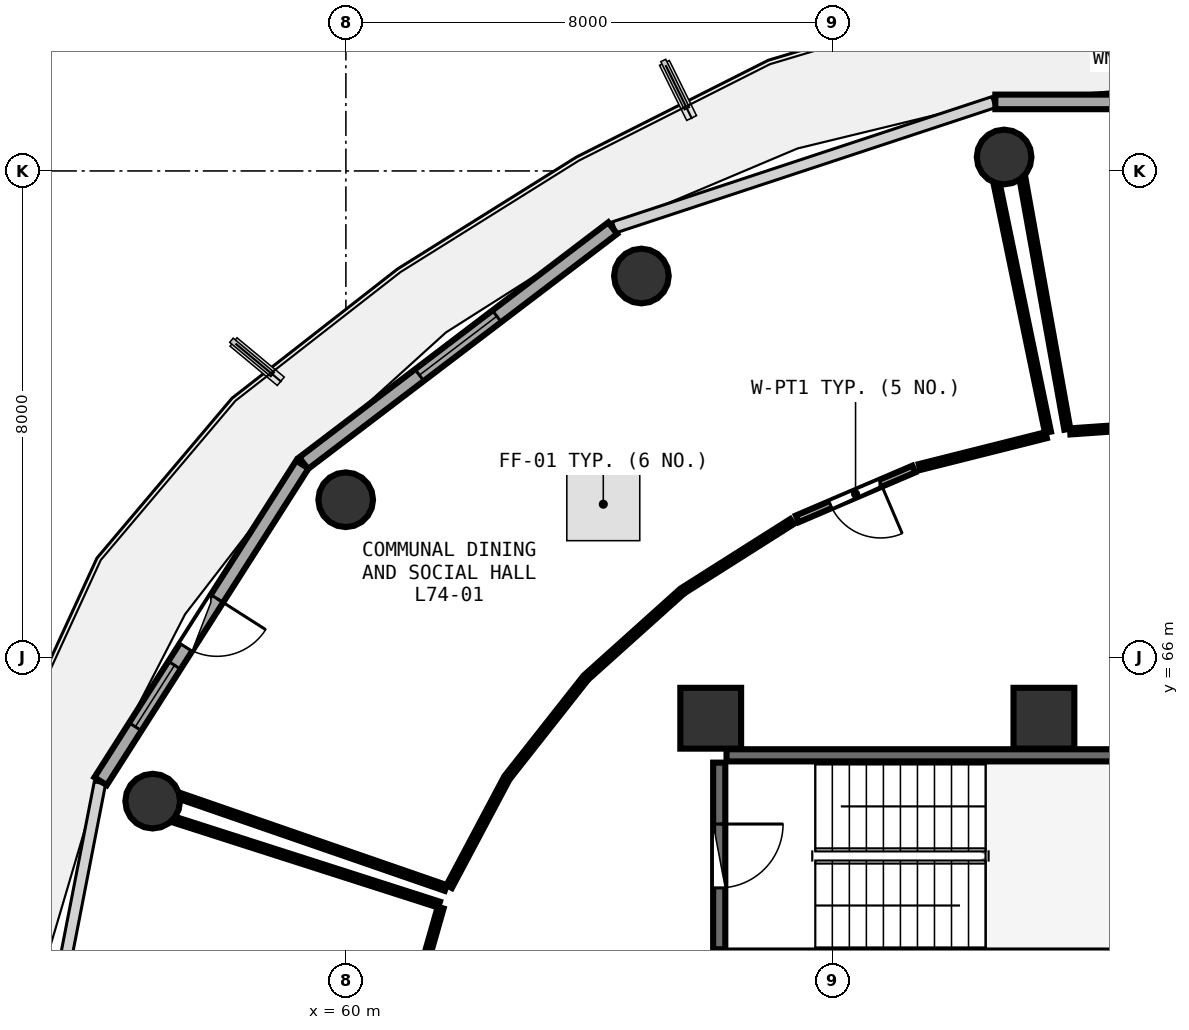
"""IFC4 building model, lengths in metres.
Left out: names, types, materials, properties, quantities, classifications, styles, units other than length and angle.
Written with IfcOpenShell. Run it as: python <this file> out.ifc"""

import sys

from ifc_helpers import new_model, si_unit, direction, frame, frame_2d, origin, origin_2d, place, context, subcontext, project, spatial, rectangle, circle, extrude, element, fill, save


model = new_model("IFC4")
c1 = context("Model", 3, precision=1e-05, world=origin(), true_north=direction((0.0, 1.0)))
c2 = subcontext(c1, "Body", "Model", "MODEL_VIEW")
j1 = project(units=[si_unit("LENGTHUNIT", "METRE"), si_unit("PLANEANGLEUNIT", "RADIAN")], contexts=[c1])
p1 = place(None, origin())
s1 = spatial("IfcSite", under=j1, at=p1, CompositionType="ELEMENT")
p2 = place(p1, origin())
s2 = spatial("IfcBuilding", under=s1, at=p2, CompositionType="ELEMENT")
p3 = place(p2, frame((0.0, 0.0, 289.95)))
s3 = spatial("IfcBuildingStorey", under=s2, at=p3, CompositionType="ELEMENT", Elevation=289.95)
for number, where, z_axis, x_axis in (
    (1, (71.48, 65.0, 0.0), (0.0, 0.0, 1.0), (1.0, 0.0, 0.0)),
    (2, (66.0, 65.0, 0.0), (0.0, 0.0, 1.0), (1.0, 0.0, 0.0)),
):
    element("IfcColumn", number, at=place(p3, frame(where, z_axis=z_axis, x_axis=x_axis)), inside=s3, PredefinedType="PILASTER", context=c2, shape_type="SweptSolid", body=[
        extrude(rectangle(XDim=1.0, YDim=1.0, at=origin_2d()), origin(), (0.0, 0.0, 1.0), 3.75),
    ])
for number, where, z_axis, x_axis in (
    (3, (70.826, 74.229, 0.0), (0.0, 0.0, 1.0), (1.0, 0.0, 0.0)),
    (4, (64.86, 72.272, 0.0), (0.0, 0.0, 1.0), (1.0, 0.0, 0.0)),
    (5, (59.997, 68.593, 0.0), (0.0, 0.0, 1.0), (1.0, 0.0, 0.0)),
    (6, (56.823, 63.636, 0.0), (0.0, 0.0, 1.0), (1.0, 0.0, 0.0)),
):
    element("IfcColumn", number, at=place(p3, frame(where, z_axis=z_axis, x_axis=x_axis)), inside=s3, PredefinedType="COLUMN", context=c2, shape_type="SweptSolid", body=[
        extrude(circle(Radius=0.45, at=origin_2d()), origin(), (0.0, 0.0, 1.0), 3.75),
    ])
p4 = place(p3, frame((77.319, 75.136, 0.0), z_axis=(0.0, 0.0, 1.0), x_axis=(-1.0, 0.0, 0.0)))
e7 = element("IfcWall", 7, at=p4, inside=s3, PredefinedType="SOLIDWALL", context=c2, shape_type="SweptSolid", body=[
    extrude(rectangle(XDim=6.638, YDim=0.24, at=frame_2d((3.319, 0.0))), origin(), (0.0, 0.0, 1.0), 3.415),
])
p5 = place(p4, frame((2.519, 0.0, 0.85)))
e8 = element("IfcOpeningElement", 8, at=p5, cuts=e7, PredefinedType="OPENING", context=c2, shape_type="SweptSolid", body=[
    extrude(rectangle(XDim=1.6, YDim=1.45, at=frame_2d((0.8, 0.725))), frame((0.0, 0.13, 0.0), z_axis=(0.0, -1.0, 0.0), x_axis=(1.0, 0.0, 0.0)), (0.0, 0.0, 1.0), 0.26),
])
p6 = place(p3, frame((64.388, 73.06, 0.0), z_axis=(0.0, 0.0, 1.0), x_axis=(-0.796010444211, -0.605282886514, 0.0)))
e9 = element("IfcWall", 9, at=p6, inside=s3, PredefinedType="SOLIDWALL", context=c2, shape_type="SweptSolid", body=[
    extrude(rectangle(XDim=6.387, YDim=0.24, at=frame_2d((3.194, 0.0))), origin(), (0.0, 0.0, 1.0), 3.415),
])
p7 = place(p6, frame((2.394, 0.0, 0.85)))
e10 = element("IfcOpeningElement", 10, at=p7, cuts=e9, PredefinedType="OPENING", context=c2, shape_type="SweptSolid", body=[
    extrude(rectangle(XDim=1.6, YDim=1.45, at=frame_2d((0.8, 0.725))), frame((0.0, 0.13, 0.0), z_axis=(0.0, -1.0, 0.0), x_axis=(1.0, 0.0, 0.0)), (0.0, 0.0, 1.0), 0.26),
])
p8 = place(p3, frame((59.284, 69.172, 0.0), z_axis=(0.0, 0.0, 1.0), x_axis=(-0.537271968456, -0.843409053728, 0.0)))
e11 = element("IfcWall", 11, at=p8, inside=s3, PredefinedType="SOLIDWALL", context=c2, shape_type="SweptSolid", body=[
    extrude(rectangle(XDim=6.175, YDim=0.24, at=frame_2d((3.087, 0.0))), origin(), (0.0, 0.0, 1.0), 3.415),
])
p9 = place(p8, frame((2.613, 0.0, 0.0)))
e12 = element("IfcOpeningElement", 12, at=p9, cuts=e11, PredefinedType="OPENING", context=c2, shape_type="SweptSolid", body=[
    extrude(rectangle(XDim=0.95, YDim=2.1, at=frame_2d((0.475, 1.05))), frame((0.0, 0.13, 0.0), z_axis=(0.0, -1.0, 0.0), x_axis=(1.0, 0.0, 0.0)), (0.0, 0.0, 1.0), 0.26),
])
p10 = place(p8, frame((3.913, 0.0, 0.85)))
e13 = element("IfcOpeningElement", 13, at=p10, cuts=e11, PredefinedType="OPENING", context=c2, shape_type="SweptSolid", body=[
    extrude(rectangle(XDim=1.2, YDim=1.45, at=frame_2d((0.6, 0.725))), frame((0.0, 0.13, 0.0), z_axis=(0.0, -1.0, 0.0), x_axis=(1.0, 0.0, 0.0)), (0.0, 0.0, 1.0), 0.26),
])
p11 = place(p3, frame((73.42, 64.39, 0.0), z_axis=(0.0, 0.0, 1.0), x_axis=(-1.0, 0.0, 0.0)))
e14 = element("IfcWall", 14, at=p11, inside=s3, PredefinedType="SHEAR", context=c2, shape_type="SweptSolid", body=[
    extrude(rectangle(XDim=7.16, YDim=0.2, at=frame_2d((3.58, 0.0))), origin(), (0.0, 0.0, 1.0), 3.43),
])
p12 = place(p3, frame((66.14, 64.27, 0.0), z_axis=(0.0, 0.0, 1.0), x_axis=(0.0, -1.0, 0.0)))
e15 = element("IfcWall", 15, at=p12, inside=s3, PredefinedType="SHEAR", context=c2, shape_type="SweptSolid", body=[
    extrude(rectangle(XDim=3.07, YDim=0.2, at=frame_2d((1.535, 0.0))), origin(), (0.0, 0.0, 1.0), 3.43),
])
p13 = place(p12, frame((1.01, 0.0, 0.0)))
e16 = element("IfcOpeningElement", 16, at=p13, cuts=e15, PredefinedType="OPENING", context=c2, shape_type="SweptSolid", body=[
    extrude(rectangle(XDim=1.05, YDim=2.1, at=frame_2d((0.525, 1.05))), frame((0.0, 0.11, 0.0), z_axis=(0.0, -1.0, 0.0), x_axis=(1.0, 0.0, 0.0)), (0.0, 0.0, 1.0), 0.22),
])
p14 = place(p3, frame((69.34, 69.097, 0.0), z_axis=(0.0, 0.0, 1.0), x_axis=(-0.919508345424, -0.39307048057, 0.0)))
e17 = element("IfcWall", 17, at=p14, inside=s3, PredefinedType="PARTITIONING", context=c2, shape_type="SweptSolid", body=[
    extrude(rectangle(XDim=2.083, YDim=0.12, at=frame_2d((1.042, 0.0))), origin(), (0.0, 0.0, 1.0), 3.42),
])
p15 = place(p14, frame((0.592, 0.0, 0.0)))
e18 = element("IfcOpeningElement", 18, at=p15, cuts=e17, PredefinedType="OPENING", context=c2, shape_type="SweptSolid", body=[
    extrude(rectangle(XDim=0.9, YDim=2.08, at=frame_2d((0.45, 1.04))), frame((0.0, 0.07, 0.0), z_axis=(0.0, -1.0, 0.0), x_axis=(1.0, 0.0, 0.0)), (0.0, 0.0, 1.0), 0.14),
])
p16 = place(p3, frame((71.516, 69.654, 0.0), z_axis=(0.0, 0.0, 1.0), x_axis=(-0.969827312174, -0.243792913272, 0.0)))
e19 = element("IfcWall", 19, at=p16, inside=s3, PredefinedType="PARTITIONING", context=c2, shape_type="SweptSolid", body=[
    extrude(rectangle(XDim=2.147, YDim=0.1, at=frame_2d((1.073, 0.0))), origin(), (0.0, 0.0, 1.0), 3.015),
])
p17 = place(p3, frame((67.335, 68.234, 0.0), z_axis=(0.0, 0.0, 1.0), x_axis=(-0.844856002064, -0.534993771717, 0.0)))
e20 = element("IfcWall", 20, at=p17, inside=s3, PredefinedType="PARTITIONING", context=c2, shape_type="SweptSolid", body=[
    extrude(rectangle(XDim=2.092, YDim=0.1, at=frame_2d((1.046, 0.0))), origin(), (0.0, 0.0, 1.0), 3.015),
])
p18 = place(p3, frame((65.504, 67.066, 0.0), z_axis=(0.0, 0.0, 1.0), x_axis=(-0.743943808924, -0.668242178527, 0.0)))
e21 = element("IfcWall", 21, at=p18, inside=s3, PredefinedType="PARTITIONING", context=c2, shape_type="SweptSolid", body=[
    extrude(rectangle(XDim=2.054, YDim=0.1, at=frame_2d((1.027, 0.0))), origin(), (0.0, 0.0, 1.0), 3.015),
])
p19 = place(p3, frame((63.921, 65.635, 0.0), z_axis=(0.0, 0.0, 1.0), x_axis=(-0.618820199788, -0.785532660259, 0.0)))
e22 = element("IfcWall", 22, at=p19, inside=s3, PredefinedType="PARTITIONING", context=c2, shape_type="SweptSolid", body=[
    extrude(rectangle(XDim=2.018, YDim=0.1, at=frame_2d((1.009, 0.0))), origin(), (0.0, 0.0, 1.0), 3.015),
])
p20 = place(p3, frame((62.629, 63.984, 0.0), z_axis=(0.0, 0.0, 1.0), x_axis=(-0.468933294906, -0.883233584579, 0.0)))
e23 = element("IfcWall", 23, at=p20, inside=s3, PredefinedType="PARTITIONING", context=c2, shape_type="SweptSolid", body=[
    extrude(rectangle(XDim=1.984, YDim=0.1, at=frame_2d((0.992, 0.0))), origin(), (0.0, 0.0, 1.0), 3.175),
])
p21 = place(p3, frame((61.642, 62.209, 0.0), z_axis=(0.0, 0.0, 1.0), x_axis=(-0.945103281494, 0.326771766388, 0.0)))
e24 = element("IfcWall", 24, at=p21, inside=s3, PredefinedType="PARTITIONING", context=c2, shape_type="SweptSolid", body=[
    extrude(rectangle(XDim=4.604, YDim=0.1, at=frame_2d((2.302, 0.0))), origin(), (0.0, 0.0, 1.0), 3.015),
])
p22 = place(p3, frame((70.707, 73.77, 0.0), z_axis=(0.0, 0.0, 1.0), x_axis=(0.202308141573, -0.979321916355, 0.0)))
e25 = element("IfcWall", 25, at=p22, inside=s3, PredefinedType="PARTITIONING", context=c2, shape_type="SweptSolid", body=[
    extrude(rectangle(XDim=4.153, YDim=0.1, at=frame_2d((2.076, 0.0))), origin(), (0.0, 0.0, 1.0), 3.015),
])
p23 = place(p3, frame((61.559, 61.885, 0.0), z_axis=(0.0, 0.0, 1.0), x_axis=(-0.274226302341, -0.961665188673, 0.0)))
e26 = element("IfcWall", 26, at=p23, inside=s3, PredefinedType="PARTITIONING", context=c2, shape_type="SweptSolid", body=[
    extrude(rectangle(XDim=1.955, YDim=0.1, at=frame_2d((0.978, 0.0))), origin(), (0.0, 0.0, 1.0), 3.42),
])
p24 = place(p3, frame((57.184, 63.329, 0.0), z_axis=(0.0, 0.0, 1.0), x_axis=(0.95227750557, -0.305233602976, 0.0)))
e27 = element("IfcWall", 27, at=p24, inside=s3, PredefinedType="PARTITIONING", context=c2, shape_type="SweptSolid", body=[
    extrude(rectangle(XDim=4.565, YDim=0.1, at=frame_2d((2.283, 0.0))), origin(), (0.0, 0.0, 1.0), 3.115),
])
p25 = place(p3, frame((74.067, 69.867, 0.0), z_axis=(0.0, 0.0, 1.0), x_axis=(-0.997574370957, -0.069608723664, 0.0)))
e28 = element("IfcWall", 28, at=p25, inside=s3, PredefinedType="PARTITIONING", context=c2, shape_type="SweptSolid", body=[
    extrude(rectangle(XDim=2.16, YDim=0.1, at=frame_2d((1.08, 0.0))), origin(), (0.0, 0.0, 1.0), 3.42),
])
p26 = place(p3, frame((71.865, 69.753, 0.0), z_axis=(0.0, 0.0, 1.0), x_axis=(-0.176199339585, 0.984354505618, 0.0)))
e29 = element("IfcWall", 29, at=p26, inside=s3, PredefinedType="PARTITIONING", context=c2, shape_type="SweptSolid", body=[
    extrude(rectangle(XDim=4.176, YDim=0.1, at=frame_2d((2.088, 0.0))), origin(), (0.0, 0.0, 1.0), 3.115),
])
p27 = place(p7, origin())
e30 = element("IfcWindow", 30, at=p27, inside=s3, PartitioningType="SINGLE_PANEL", PredefinedType="WINDOW", context=c2, shape_type="SweptSolid", body=[
    extrude(rectangle(XDim=1.6, YDim=1.45, at=frame_2d((0.8, 0.725))), frame((0.0, 0.03, 0.0), z_axis=(0.0, -1.0, 0.0), x_axis=(1.0, 0.0, 0.0)), (0.0, 0.0, 1.0), 0.06),
])
fill(e10, e30)
p28 = place(p9, frame((0.95, 0.0, 0.0), z_axis=(0.0, 0.0, 1.0), x_axis=(-1.0, 0.0, 0.0)))
e31 = element("IfcDoor", 31, at=p28, inside=s3, OperationType="SINGLE_SWING_RIGHT", PredefinedType="DOOR", context=c2, shape_type="SweptSolid", body=[
    extrude(rectangle(XDim=0.95, YDim=2.1, at=frame_2d((0.475, 1.05))), frame((0.0, 0.025, 0.0), z_axis=(0.0, -1.0, 0.0), x_axis=(1.0, 0.0, 0.0)), (0.0, 0.0, 1.0), 0.05),
])
fill(e12, e31)
p29 = place(p10, origin())
e32 = element("IfcWindow", 32, at=p29, inside=s3, PartitioningType="SINGLE_PANEL", PredefinedType="WINDOW", context=c2, shape_type="SweptSolid", body=[
    extrude(rectangle(XDim=1.2, YDim=1.45, at=frame_2d((0.6, 0.725))), frame((0.0, 0.03, 0.0), z_axis=(0.0, -1.0, 0.0), x_axis=(1.0, 0.0, 0.0)), (0.0, 0.0, 1.0), 0.06),
])
fill(e13, e32)
p30 = place(p13, origin())
e33 = element("IfcDoor", 33, at=p30, inside=s3, OperationType="SINGLE_SWING_LEFT", PredefinedType="DOOR", context=c2, shape_type="SweptSolid", body=[
    extrude(rectangle(XDim=1.05, YDim=2.1, at=frame_2d((0.525, 1.05))), frame((0.0, 0.025, 0.0), z_axis=(0.0, -1.0, 0.0), x_axis=(1.0, 0.0, 0.0)), (0.0, 0.0, 1.0), 0.05),
])
fill(e16, e33)
p31 = place(p15, origin())
e34 = element("IfcDoor", 34, at=p31, inside=s3, OperationType="SINGLE_SWING_LEFT", PredefinedType="DOOR", context=c2, shape_type="SweptSolid", body=[
    extrude(rectangle(XDim=0.9, YDim=2.08, at=frame_2d((0.45, 1.04))), frame((0.0, 0.025, 0.0), z_axis=(0.0, -1.0, 0.0), x_axis=(1.0, 0.0, 0.0)), (0.0, 0.0, 1.0), 0.05),
])
fill(e18, e34)
save(model, sys.argv[1])
